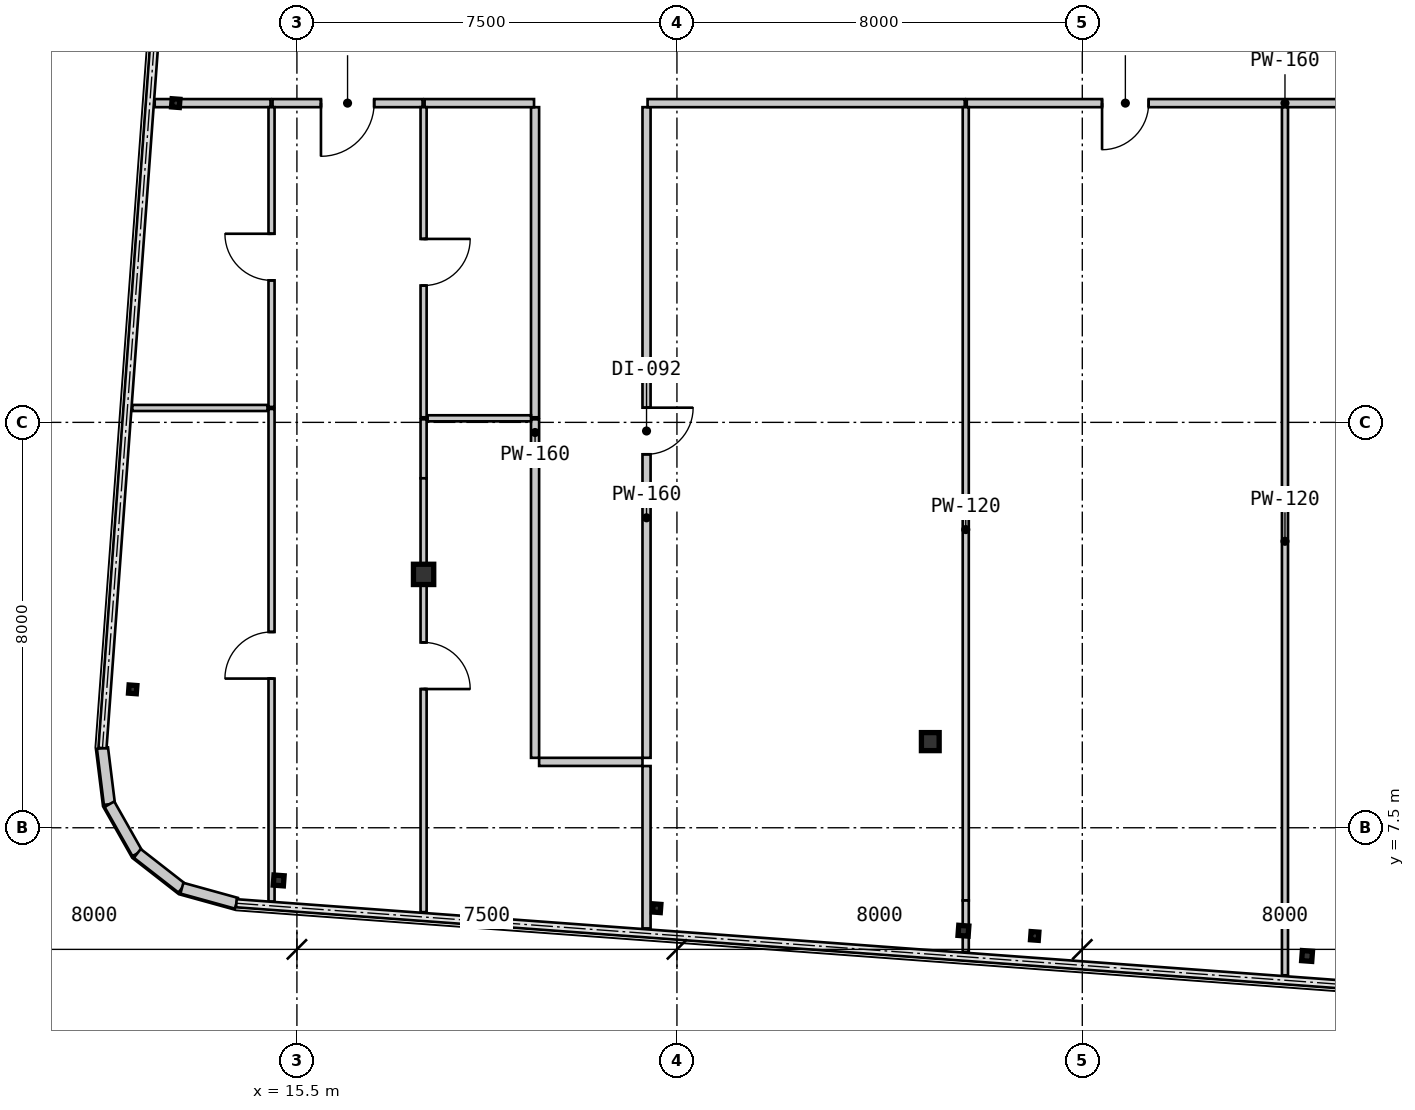
"""IFC4 building model, lengths in metres.
Left out: names, types, materials, properties, quantities, classifications, styles, units other than length and angle.
Written with IfcOpenShell. Run it as: python <this file> out.ifc"""

import sys

from ifc_helpers import new_model, si_unit, direction, frame, frame_2d, origin, origin_2d, place, context, subcontext, project, spatial, rectangle, hollow_rectangle, i_section, extrude, source, transform, mapped, element, fill, save


model = new_model("IFC4")
c1 = context("Model", 3, precision=1e-05, world=origin(), true_north=direction((0.0, 1.0)))
c2 = subcontext(c1, "Body", "Model", "MODEL_VIEW")
j1 = project(units=[si_unit("LENGTHUNIT", "METRE"), si_unit("PLANEANGLEUNIT", "RADIAN")], contexts=[c1])
p1 = place(None, origin())
s1 = spatial("IfcSite", under=j1, at=p1, CompositionType="ELEMENT")
p2 = place(p1, origin())
s2 = spatial("IfcBuilding", under=s1, at=p2, CompositionType="ELEMENT")
p3 = place(p2, frame((0.0, 0.0, 220.85)))
s3 = spatial("IfcBuildingStorey", under=s2, at=p3, CompositionType="ELEMENT", Elevation=220.85)
m1 = source(origin(), c2, "Body", "SweptSolid", [
    extrude(i_section(OverallWidth=0.35, OverallDepth=0.356, WebThickness=0.018, FlangeThickness=0.028, at=origin_2d()), origin(), (0.0, 0.0, 1.0), 3.15),
])
p4 = place(p3, frame((28.0, 9.2, 0.0), z_axis=(0.0, 0.0, 1.0), x_axis=(1.0, 0.0, 0.0)))
e1 = element("IfcColumn", 1, at=p4, inside=s3, PredefinedType="COLUMN", context=c2, shape_type="MappedRepresentation", body=[
    mapped(m1, transform((0.0, 0.0, 0.0), scale=1.0)),
])
m2 = source(origin(), c2, "Body", "SweptSolid", [
    extrude(hollow_rectangle(XDim=0.4, YDim=0.4, WallThickness=0.016, at=origin_2d()), origin(), (0.0, 0.0, 1.0), 3.15),
])
p5 = place(p3, frame((18.0, 12.5, 0.0), z_axis=(0.0, 0.0, 1.0), x_axis=(1.0, 0.0, 0.0)))
e2 = element("IfcColumn", 2, at=p5, inside=s3, PredefinedType="COLUMN", context=c2, shape_type="MappedRepresentation", body=[
    mapped(m2, transform((0.0, 0.0, 0.0), scale=1.0)),
])
m3 = source(origin(), c2, "Body", "SweptSolid", [
    extrude(hollow_rectangle(XDim=0.2, YDim=0.2, WallThickness=0.009, at=origin_2d()), origin(), (0.0, 0.0, 1.0), 3.15),
])
p6 = place(p3, frame((15.141, 6.46, 0.0), z_axis=(0.0, 0.0, 1.0), x_axis=(0.997314477224, -0.073238197128, 0.0)))
e3 = element("IfcColumn", 3, at=p6, inside=s3, PredefinedType="COLUMN", context=c2, shape_type="MappedRepresentation", body=[
    mapped(m3, transform((0.0, 0.0, 0.0), scale=1.0)),
])
m4 = source(origin(), c2, "Body", "SweptSolid", [
    extrude(i_section(OverallWidth=0.154, OverallDepth=0.162, WebThickness=0.008, FlangeThickness=0.011, at=origin_2d()), origin(), (0.0, 0.0, 1.0), 3.15),
])
for number, where, z_axis, x_axis in (
    (4, (22.601, 5.912, 0.0), (0.0, 0.0, 1.0), (0.997, -0.073, 0.0)),
    (5, (30.061, 5.365, 0.0), (0.0, 0.0, 1.0), (0.997, -0.073, 0.0)),
    (6, (12.259, 10.231, 0.0), (0.0, 0.0, 1.0), (0.997, -0.073, 0.0)),
    (7, (13.109, 21.8, 0.0), (0.0, 0.0, 1.0), (0.997, -0.073, 0.0)),
):
    element("IfcColumn", number, at=place(p3, frame(where, z_axis=z_axis, x_axis=x_axis)), inside=s3, PredefinedType="COLUMN", context=c2, shape_type="MappedRepresentation", body=[
        mapped(m4, transform((0.0, 0.0, 0.0), scale=1.0)),
    ])
for number, where, z_axis, x_axis in (
    (8, (28.654, 5.468, 0.0), (0.0, 0.0, 1.0), (0.997, -0.073, 0.0)),
    (9, (35.436, 4.97, 0.0), (0.0, 0.0, 1.0), (0.997, -0.073, 0.0)),
):
    element("IfcColumn", number, at=place(p3, frame(where, z_axis=z_axis, x_axis=x_axis)), inside=s3, PredefinedType="COLUMN", context=c2, shape_type="MappedRepresentation", body=[
        mapped(m3, transform((0.0, 0.0, 0.0), scale=1.0)),
    ])
m5 = source(origin(), c2, "Body", "SweptSolid", [
    extrude(rectangle(XDim=1.116, YDim=0.22, at=frame_2d((0.558, 0.0))), origin(), (0.0, 0.0, 1.0), 2.93),
])
for number, where, z_axis, x_axis in (
    (10, (11.663, 9.072, 0.0), (0.0, 0.0, 1.0), (0.123, -0.992, 0.0)),
    (11, (11.8, 7.965, 0.0), (0.0, 0.0, 1.0), (0.493, -0.87, 0.0)),
    (12, (12.35, 6.994, 0.0), (0.0, 0.0, 1.0), (0.789, -0.615, 0.0)),
):
    element("IfcWall", number, at=place(p3, frame(where, z_axis=z_axis, x_axis=x_axis)), inside=s3, PredefinedType="SOLIDWALL", context=c2, shape_type="MappedRepresentation", body=[
        mapped(m5, transform((0.0, 0.0, 0.0), scale=1.0)),
    ])
m6 = source(origin(), c2, "Body", "SweptSolid", [
    extrude(rectangle(XDim=1.116, YDim=0.22, at=frame_2d((0.558, 0.0))), origin(), (0.0, 0.0, 1.0), 2.93),
])
p7 = place(p3, frame((13.23, 6.307, 0.0), z_axis=(0.0, 0.0, 1.0), x_axis=(0.963890028874, -0.266300605026, 0.0)))
e13 = element("IfcWall", 13, at=p7, inside=s3, PredefinedType="SOLIDWALL", context=c2, shape_type="MappedRepresentation", body=[
    mapped(m6, transform((0.0, 0.0, 0.0), scale=1.0)),
])
m7 = source(origin(), c2, "Body", "SweptSolid", [
    extrude(rectangle(XDim=2.96, YDim=0.16, at=frame_2d((1.48, 0.0))), origin(), (0.0, 0.0, 1.0), 2.93),
])
p8 = place(p3, frame((17.98, 21.8, 0.0), z_axis=(0.0, 0.0, 1.0), x_axis=(-1.0, 0.0, 0.0)))
e14 = element("IfcWall", 14, at=p8, inside=s3, PredefinedType="PARTITIONING", context=c2, shape_type="MappedRepresentation", body=[
    mapped(m7, transform((0.0, 0.0, 0.0), scale=1.0)),
])
m8 = source(origin(), c2, "Body", "SweptSolid", [
    extrude(rectangle(XDim=1.05, YDim=2.1, at=frame_2d((0.525, 1.05))), frame((0.0, 0.09, 0.0), z_axis=(0.0, -1.0, 0.0), x_axis=(1.0, 0.0, 0.0)), (0.0, 0.0, 1.0), 0.18),
])
p9 = place(p8, frame((0.955, 0.0, 0.0)))
e15 = element("IfcOpeningElement", 15, at=p9, cuts=e14, PredefinedType="OPENING", context=c2, shape_type="MappedRepresentation", body=[
    mapped(m8, transform((0.0, 0.0, 0.0), scale=1.0)),
])
m9 = source(origin(), c2, "Body", "SweptSolid", [
    extrude(rectangle(XDim=6.12, YDim=0.16, at=frame_2d((3.06, 0.0))), origin(), (0.0, 0.0, 1.0), 2.93),
])
p10 = place(p3, frame((20.2, 15.6, 0.0), z_axis=(0.0, 0.0, 1.0), x_axis=(0.0, 1.0, 0.0)))
e16 = element("IfcWall", 16, at=p10, inside=s3, PredefinedType="PARTITIONING", context=c2, shape_type="MappedRepresentation", body=[
    mapped(m9, transform((0.0, 0.0, 0.0), scale=1.0)),
])
m10 = source(origin(), c2, "Body", "SweptSolid", [
    extrude(rectangle(XDim=2.159, YDim=0.16, at=frame_2d((1.08, 0.0))), origin(), (0.0, 0.0, 1.0), 2.93),
])
p11 = place(p3, frame((20.18, 21.8, 0.0), z_axis=(0.0, 0.0, 1.0), x_axis=(-1.0, 0.0, 0.0)))
e17 = element("IfcWall", 17, at=p11, inside=s3, PredefinedType="PARTITIONING", context=c2, shape_type="MappedRepresentation", body=[
    mapped(m10, transform((0.0, 0.0, 0.0), scale=1.0)),
])
m11 = source(origin(), c2, "Body", "SweptSolid", [
    extrude(rectangle(XDim=2.286, YDim=0.16, at=frame_2d((1.143, 0.0))), origin(), (0.0, 0.0, 1.0), 2.93),
])
p12 = place(p3, frame((14.979, 21.8, 0.0), z_axis=(0.0, 0.0, 1.0), x_axis=(-1.0, 0.0, 0.0)))
e18 = element("IfcWall", 18, at=p12, inside=s3, PredefinedType="PARTITIONING", context=c2, shape_type="MappedRepresentation", body=[
    mapped(m11, transform((0.0, 0.0, 0.0), scale=1.0)),
])
m12 = source(origin(), c2, "Body", "SweptSolid", [
    extrude(rectangle(XDim=6.68, YDim=0.16, at=frame_2d((3.34, 0.0))), origin(), (0.0, 0.0, 1.0), 2.93),
])
p13 = place(p3, frame((20.2, 8.88, 0.0), z_axis=(0.0, 0.0, 1.0), x_axis=(0.0, 1.0, 0.0)))
e19 = element("IfcWall", 19, at=p13, inside=s3, PredefinedType="PARTITIONING", context=c2, shape_type="MappedRepresentation", body=[
    mapped(m12, transform((0.0, 0.0, 0.0), scale=1.0)),
])
m13 = source(origin(), c2, "Body", "SweptSolid", [
    extrude(rectangle(XDim=2.04, YDim=0.16, at=frame_2d((1.02, 0.0))), origin(), (0.0, 0.0, 1.0), 2.93),
])
p14 = place(p3, frame((22.32, 8.8, 0.0), z_axis=(0.0, 0.0, 1.0), x_axis=(-1.0, 0.0, 0.0)))
e20 = element("IfcWall", 20, at=p14, inside=s3, PredefinedType="PARTITIONING", context=c2, shape_type="MappedRepresentation", body=[
    mapped(m13, transform((0.0, 0.0, 0.0), scale=1.0)),
])
m14 = source(origin(), c2, "Body", "SweptSolid", [
    extrude(rectangle(XDim=12.84, YDim=0.16, at=frame_2d((6.42, 0.0))), origin(), (0.0, 0.0, 1.0), 2.93),
])
p15 = place(p3, frame((22.4, 21.72, 0.0), z_axis=(0.0, 0.0, 1.0), x_axis=(0.0, -1.0, 0.0)))
e21 = element("IfcWall", 21, at=p15, inside=s3, PredefinedType="PARTITIONING", context=c2, shape_type="MappedRepresentation", body=[
    mapped(m14, transform((0.0, 0.0, 0.0), scale=1.0)),
])
m15 = source(origin(), c2, "Body", "SweptSolid", [
    extrude(rectangle(XDim=0.92, YDim=2.1, at=frame_2d((0.46, 1.05))), frame((0.0, 0.09, 0.0), z_axis=(0.0, -1.0, 0.0), x_axis=(1.0, 0.0, 0.0)), (0.0, 0.0, 1.0), 0.18),
])
p16 = place(p15, frame((5.93, 0.0, 0.0)))
e22 = element("IfcOpeningElement", 22, at=p16, cuts=e21, PredefinedType="OPENING", context=c2, shape_type="MappedRepresentation", body=[
    mapped(m15, transform((0.0, 0.0, 0.0), scale=1.0)),
])
m16 = source(origin(), c2, "Body", "SweptSolid", [
    extrude(rectangle(XDim=6.259, YDim=0.16, at=frame_2d((3.13, 0.0))), origin(), (0.0, 0.0, 1.0), 2.93),
])
p17 = place(p3, frame((28.68, 21.8, 0.0), z_axis=(0.0, 0.0, 1.0), x_axis=(-1.0, 0.0, 0.0)))
e23 = element("IfcWall", 23, at=p17, inside=s3, PredefinedType="PARTITIONING", context=c2, shape_type="MappedRepresentation", body=[
    mapped(m16, transform((0.0, 0.0, 0.0), scale=1.0)),
])
m17 = source(origin(), c2, "Body", "SweptSolid", [
    extrude(rectangle(XDim=6.26, YDim=0.16, at=frame_2d((3.13, 0.0))), origin(), (0.0, 0.0, 1.0), 2.93),
])
p18 = place(p3, frame((34.98, 21.8, 0.0), z_axis=(0.0, 0.0, 1.0), x_axis=(-1.0, 0.0, 0.0)))
e24 = element("IfcWall", 24, at=p18, inside=s3, PredefinedType="PARTITIONING", context=c2, shape_type="MappedRepresentation", body=[
    mapped(m17, transform((0.0, 0.0, 0.0), scale=1.0)),
])
p19 = place(p18, frame((2.67, 0.0, 0.0)))
e25 = element("IfcOpeningElement", 25, at=p19, cuts=e24, PredefinedType="OPENING", context=c2, shape_type="MappedRepresentation", body=[
    mapped(m15, transform((0.0, 0.0, 0.0), scale=1.0)),
])
p20 = place(p3, frame((41.28, 21.8, 0.0), z_axis=(0.0, 0.0, 1.0), x_axis=(-1.0, 0.0, 0.0)))
e26 = element("IfcWall", 26, at=p20, inside=s3, PredefinedType="PARTITIONING", context=c2, shape_type="MappedRepresentation", body=[
    mapped(m17, transform((0.0, 0.0, 0.0), scale=1.0)),
])
p21 = place(p20, frame((2.67, 0.0, 0.0)))
e27 = element("IfcOpeningElement", 27, at=p21, cuts=e26, PredefinedType="OPENING", context=c2, shape_type="MappedRepresentation", body=[
    mapped(m15, transform((0.0, 0.0, 0.0), scale=1.0)),
])
m18 = source(origin(), c2, "Body", "SweptSolid", [
    extrude(rectangle(XDim=6.12, YDim=0.12, at=frame_2d((3.06, 0.0))), origin(), (0.0, 0.0, 1.0), 2.93),
])
p22 = place(p3, frame((18.0, 21.72, 0.0), z_axis=(0.0, 0.0, 1.0), x_axis=(0.0, -1.0, 0.0)))
e28 = element("IfcWall", 28, at=p22, inside=s3, PredefinedType="PARTITIONING", context=c2, shape_type="MappedRepresentation", body=[
    mapped(m18, transform((0.0, 0.0, 0.0), scale=1.0)),
])
m19 = source(origin(), c2, "Body", "SweptSolid", [
    extrude(rectangle(XDim=0.92, YDim=2.1, at=frame_2d((0.46, 1.05))), frame((0.0, 0.07, 0.0), z_axis=(0.0, -1.0, 0.0), x_axis=(1.0, 0.0, 0.0)), (0.0, 0.0, 1.0), 0.14),
])
p23 = place(p22, frame((2.6, 0.0, 0.0)))
e29 = element("IfcOpeningElement", 29, at=p23, cuts=e28, PredefinedType="OPENING", context=c2, shape_type="MappedRepresentation", body=[
    mapped(m19, transform((0.0, 0.0, 0.0), scale=1.0)),
])
m20 = source(origin(), c2, "Body", "SweptSolid", [
    extrude(rectangle(XDim=5.916, YDim=0.12, at=frame_2d((2.958, 0.0))), origin(), (0.0, 0.0, 1.0), 2.93),
])
p24 = place(p3, frame((14.999, 15.804, 0.0), z_axis=(0.0, 0.0, 1.0), x_axis=(0.0, 1.0, 0.0)))
e30 = element("IfcWall", 30, at=p24, inside=s3, PredefinedType="PARTITIONING", context=c2, shape_type="MappedRepresentation", body=[
    mapped(m20, transform((0.0, 0.0, 0.0), scale=1.0)),
])
p25 = place(p24, frame((2.498, 0.0, 0.0)))
e31 = element("IfcOpeningElement", 31, at=p25, cuts=e30, PredefinedType="OPENING", context=c2, shape_type="MappedRepresentation", body=[
    mapped(m19, transform((0.0, 0.0, 0.0), scale=1.0)),
])
m21 = source(origin(), c2, "Body", "SweptSolid", [
    extrude(rectangle(XDim=9.72, YDim=0.12, at=frame_2d((4.86, 0.0))), origin(), (0.0, 0.0, 1.0), 2.93),
])
p26 = place(p3, frame((14.999, 6.044, 0.0), z_axis=(0.0, 0.0, 1.0), x_axis=(0.0, 1.0, 0.0)))
e32 = element("IfcWall", 32, at=p26, inside=s3, PredefinedType="PARTITIONING", context=c2, shape_type="MappedRepresentation", body=[
    mapped(m21, transform((0.0, 0.0, 0.0), scale=1.0)),
])
p27 = place(p26, frame((4.4, 0.0, 0.0)))
e33 = element("IfcOpeningElement", 33, at=p27, cuts=e32, PredefinedType="OPENING", context=c2, shape_type="MappedRepresentation", body=[
    mapped(m19, transform((0.0, 0.0, 0.0), scale=1.0)),
])
m22 = source(origin(), c2, "Body", "SweptSolid", [
    extrude(rectangle(XDim=1.164, YDim=0.12, at=frame_2d((0.582, 0.0))), origin(), (0.0, 0.0, 1.0), 2.93),
])
p28 = place(p3, frame((18.0, 15.56, 0.0), z_axis=(0.0, 0.0, 1.0), x_axis=(0.0, -1.0, 0.0)))
e34 = element("IfcWall", 34, at=p28, inside=s3, PredefinedType="PARTITIONING", context=c2, shape_type="MappedRepresentation", body=[
    mapped(m22, transform((0.0, 0.0, 0.0), scale=1.0)),
])
m23 = source(origin(), c2, "Body", "SweptSolid", [
    extrude(rectangle(XDim=1.901, YDim=0.12, at=frame_2d((0.951, 0.0))), origin(), (0.0, 0.0, 1.0), 2.397),
])
p29 = place(p3, frame((18.0, 14.396, 0.0), z_axis=(0.0, 0.0, 1.0), x_axis=(0.0, -1.0, 0.0)))
e35 = element("IfcWall", 35, at=p29, inside=s3, PredefinedType="PARTITIONING", context=c2, shape_type="MappedRepresentation", body=[
    mapped(m23, transform((0.0, 0.0, 0.0), scale=1.0)),
])
m24 = source(origin(), c2, "Body", "SweptSolid", [
    extrude(rectangle(XDim=6.66, YDim=0.12, at=frame_2d((3.33, 0.0))), origin(), (0.0, 0.0, 1.0), 2.93),
])
p30 = place(p3, frame((18.0, 12.495, 0.0), z_axis=(0.0, 0.0, 1.0), x_axis=(0.0, -1.0, 0.0)))
e36 = element("IfcWall", 36, at=p30, inside=s3, PredefinedType="PARTITIONING", context=c2, shape_type="MappedRepresentation", body=[
    mapped(m24, transform((0.0, 0.0, 0.0), scale=1.0)),
])
p31 = place(p30, frame((1.337, 0.0, 0.0)))
e37 = element("IfcOpeningElement", 37, at=p31, cuts=e36, PredefinedType="OPENING", context=c2, shape_type="MappedRepresentation", body=[
    mapped(m19, transform((0.0, 0.0, 0.0), scale=1.0)),
])
m25 = source(origin(), c2, "Body", "SweptSolid", [
    extrude(rectangle(XDim=2.04, YDim=0.12, at=frame_2d((1.02, 0.0))), origin(), (0.0, 0.0, 1.0), 2.93),
])
p32 = place(p3, frame((20.12, 15.58, 0.0), z_axis=(0.0, 0.0, 1.0), x_axis=(-1.0, 0.0, 0.0)))
e38 = element("IfcWall", 38, at=p32, inside=s3, PredefinedType="PARTITIONING", context=c2, shape_type="MappedRepresentation", body=[
    mapped(m25, transform((0.0, 0.0, 0.0), scale=1.0)),
])
m26 = source(origin(), c2, "Body", "SweptSolid", [
    extrude(rectangle(XDim=2.667, YDim=0.12, at=frame_2d((1.334, 0.0))), origin(), (0.0, 0.0, 1.0), 2.93),
])
p33 = place(p3, frame((14.919, 15.784, 0.0), z_axis=(0.0, 0.0, 1.0), x_axis=(-1.0, 0.0, 0.0)))
e39 = element("IfcWall", 39, at=p33, inside=s3, PredefinedType="PARTITIONING", context=c2, shape_type="MappedRepresentation", body=[
    mapped(m26, transform((0.0, 0.0, 0.0), scale=1.0)),
])
m27 = source(origin(), c2, "Body", "SweptSolid", [
    extrude(rectangle(XDim=3.204, YDim=0.16, at=frame_2d((1.602, 0.0))), origin(), (0.0, 0.0, 1.0), 2.93),
])
p34 = place(p3, frame((22.4, 8.718, 0.0), z_axis=(0.0, 0.0, 1.0), x_axis=(0.0, -1.0, 0.0)))
e40 = element("IfcWall", 40, at=p34, inside=s3, PredefinedType="PARTITIONING", context=c2, shape_type="MappedRepresentation", body=[
    mapped(m27, transform((0.0, 0.0, 0.0), scale=1.0)),
])
m28 = source(origin(), c2, "Body", "SweptSolid", [
    extrude(rectangle(XDim=15.655, YDim=0.12, at=frame_2d((7.828, 0.0))), origin(), (0.0, 0.0, 1.0), 2.93),
])
p35 = place(p3, frame((28.7, 21.72, 0.0), z_axis=(0.0, 0.0, 1.0), x_axis=(0.0, -1.0, 0.0)))
e41 = element("IfcWall", 41, at=p35, inside=s3, PredefinedType="PARTITIONING", context=c2, shape_type="MappedRepresentation", body=[
    mapped(m28, transform((0.0, 0.0, 0.0), scale=1.0)),
])
m29 = source(origin(), c2, "Body", "SweptSolid", [
    extrude(rectangle(XDim=0.599, YDim=0.12, at=frame_2d((0.3, 0.0))), origin(), (0.0, 0.0, 1.0), 2.524),
])
p36 = place(p3, frame((28.7, 6.065, 0.0), z_axis=(0.0, 0.0, 1.0), x_axis=(0.0, -1.0, 0.0)))
e42 = element("IfcWall", 42, at=p36, inside=s3, PredefinedType="PARTITIONING", context=c2, shape_type="MappedRepresentation", body=[
    mapped(m29, transform((0.0, 0.0, 0.0), scale=1.0)),
])
m30 = source(origin(), c2, "Body", "SweptSolid", [
    extrude(rectangle(XDim=0.416, YDim=0.12, at=frame_2d((0.208, 0.0))), origin(), (0.0, 0.0, 1.0), 2.93),
])
p37 = place(p3, frame((28.7, 5.465, 0.0), z_axis=(0.0, 0.0, 1.0), x_axis=(0.0, -1.0, 0.0)))
e43 = element("IfcWall", 43, at=p37, inside=s3, PredefinedType="PARTITIONING", context=c2, shape_type="MappedRepresentation", body=[
    mapped(m30, transform((0.0, 0.0, 0.0), scale=1.0)),
])
m31 = source(origin(), c2, "Body", "SweptSolid", [
    extrude(rectangle(XDim=17.13, YDim=0.12, at=frame_2d((8.565, 0.0))), origin(), (0.0, 0.0, 1.0), 2.93),
])
p38 = place(p3, frame((35.0, 21.718, 0.0), z_axis=(0.0, 0.0, 1.0), x_axis=(0.0, -1.0, 0.0)))
e44 = element("IfcWall", 44, at=p38, inside=s3, PredefinedType="PARTITIONING", context=c2, shape_type="MappedRepresentation", body=[
    mapped(m31, transform((0.0, 0.0, 0.0), scale=1.0)),
])
m32 = source(origin(), c2, "Body", "SweptSolid", [
    extrude(rectangle(XDim=1.05, YDim=2.1, at=frame_2d((0.525, 1.05))), frame((0.0, 0.025, 0.0), z_axis=(0.0, -1.0, 0.0), x_axis=(1.0, 0.0, 0.0)), (0.0, 0.0, 1.0), 0.05),
])
p39 = place(p9, origin())
e45 = element("IfcDoor", 45, at=p39, inside=s3, OperationType="SINGLE_SWING_RIGHT", PredefinedType="DOOR", context=c2, shape_type="MappedRepresentation", body=[
    mapped(m32, transform((0.0, 0.0, 0.0), scale=1.0)),
])
fill(e15, e45)
m33 = source(origin(), c2, "Body", "SweptSolid", [
    extrude(rectangle(XDim=0.92, YDim=2.1, at=frame_2d((0.46, 1.05))), frame((0.0, 0.025, 0.0), z_axis=(0.0, -1.0, 0.0), x_axis=(1.0, 0.0, 0.0)), (0.0, 0.0, 1.0), 0.05),
])
p40 = place(p16, origin())
e46 = element("IfcDoor", 46, at=p40, inside=s3, OperationType="SINGLE_SWING_LEFT", PredefinedType="DOOR", context=c2, shape_type="MappedRepresentation", body=[
    mapped(m33, transform((0.0, 0.0, 0.0), scale=1.0)),
])
fill(e22, e46)
p41 = place(p19, origin())
e47 = element("IfcDoor", 47, at=p41, inside=s3, OperationType="SINGLE_SWING_RIGHT", PredefinedType="DOOR", context=c2, shape_type="MappedRepresentation", body=[
    mapped(m33, transform((0.0, 0.0, 0.0), scale=1.0)),
])
fill(e25, e47)
p42 = place(p23, origin())
e48 = element("IfcDoor", 48, at=p42, inside=s3, OperationType="SINGLE_SWING_LEFT", PredefinedType="DOOR", context=c2, shape_type="MappedRepresentation", body=[
    mapped(m33, transform((0.0, 0.0, 0.0), scale=1.0)),
])
fill(e29, e48)
p43 = place(p25, origin())
e49 = element("IfcDoor", 49, at=p43, inside=s3, OperationType="SINGLE_SWING_RIGHT", PredefinedType="DOOR", context=c2, shape_type="MappedRepresentation", body=[
    mapped(m33, transform((0.0, 0.0, 0.0), scale=1.0)),
])
fill(e31, e49)
p44 = place(p27, origin())
e50 = element("IfcDoor", 50, at=p44, inside=s3, OperationType="SINGLE_SWING_LEFT", PredefinedType="DOOR", context=c2, shape_type="MappedRepresentation", body=[
    mapped(m33, transform((0.0, 0.0, 0.0), scale=1.0)),
])
fill(e33, e50)
p45 = place(p31, origin())
e51 = element("IfcDoor", 51, at=p45, inside=s3, OperationType="SINGLE_SWING_RIGHT", PredefinedType="DOOR", context=c2, shape_type="MappedRepresentation", body=[
    mapped(m33, transform((0.0, 0.0, 0.0), scale=1.0)),
])
fill(e37, e51)
save(model, sys.argv[1])
